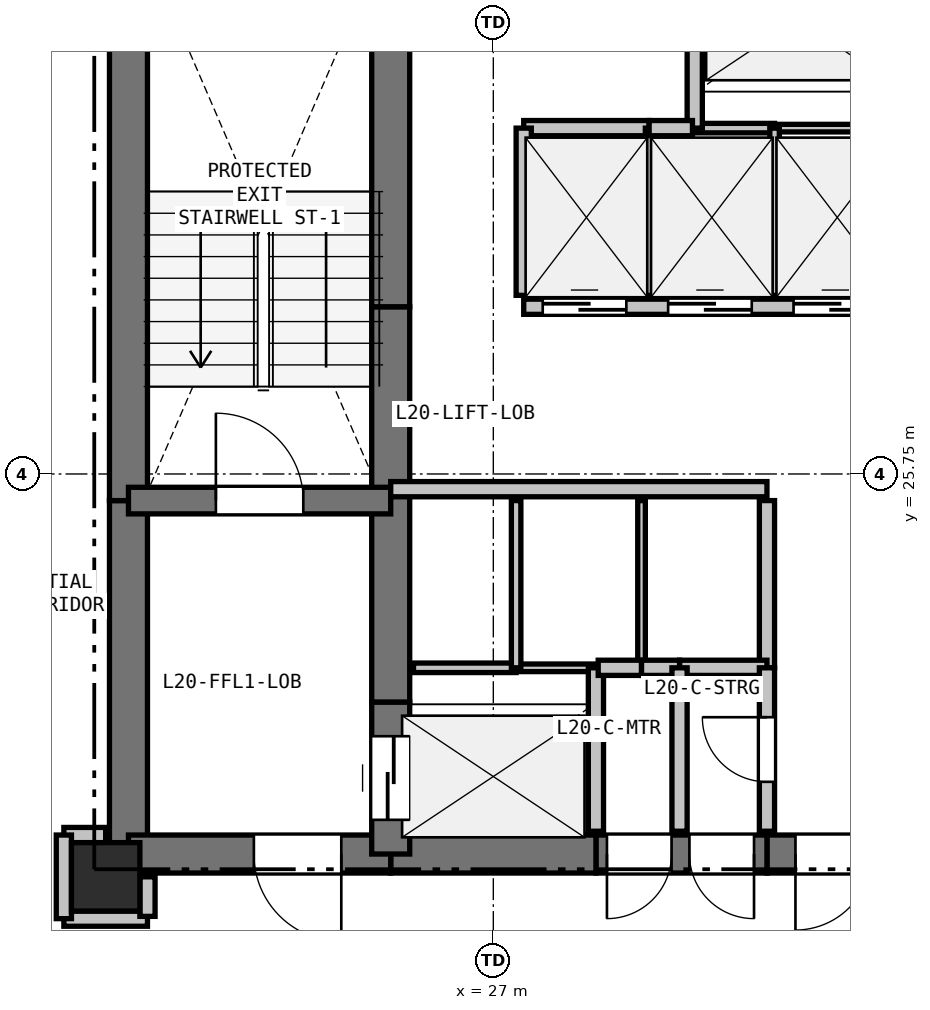
"""IFC4 building model, lengths in metres.
Left out: names, types, materials, properties, quantities, classifications, styles, units other than length and angle.
Written with IfcOpenShell. Run it as: python <this file> out.ifc"""

import sys

from ifc_helpers import new_model, si_unit, direction, frame, frame_2d, origin, origin_2d, place, context, subcontext, project, spatial, rectangle, extrude, element, fill, save


model = new_model("IFC4")
c1 = context("Model", 3, precision=1e-05, world=origin(), true_north=direction((0.0, 1.0)))
c2 = subcontext(c1, "Body", "Model", "MODEL_VIEW")
j1 = project(units=[si_unit("LENGTHUNIT", "METRE"), si_unit("PLANEANGLEUNIT", "RADIAN")], contexts=[c1])
p1 = place(None, origin())
s1 = spatial("IfcSite", under=j1, at=p1, CompositionType="ELEMENT")
p2 = place(p1, origin())
s2 = spatial("IfcBuilding", under=s1, at=p2, CompositionType="ELEMENT")
p3 = place(p2, frame((0.0, 0.0, 76.8)))
s3 = spatial("IfcBuildingStorey", under=s2, at=p3, CompositionType="ELEMENT", Elevation=76.8)
p4 = place(p3, frame((21.9, 20.45, 0.0), z_axis=(0.0, 0.0, 1.0), x_axis=(1.0, 0.0, 0.0)))
e1 = element("IfcColumn", 1, at=p4, inside=s3, PredefinedType="COLUMN", context=c2, shape_type="SweptSolid", body=[
    extrude(rectangle(XDim=0.9, YDim=0.9, at=origin_2d()), origin(), (0.0, 0.0, 1.0), 3.3),
])
p5 = place(p3, frame((22.2, 20.75, 0.0), z_axis=(0.0, 0.0, 1.0), x_axis=(0.0, 1.0, 0.0)))
e2 = element("IfcWall", 2, at=p5, inside=s3, PredefinedType="SHEAR", context=c2, shape_type="SweptSolid", body=[
    extrude(rectangle(XDim=4.65, YDim=0.5, at=frame_2d((2.325, 0.0))), origin(), (0.0, 0.0, 1.0), 3.05),
])
p6 = place(p3, frame((22.2, 25.4, 0.0), z_axis=(0.0, 0.0, 1.0), x_axis=(0.0, 1.0, 0.0)))
e3 = element("IfcWall", 3, at=p6, inside=s3, PredefinedType="SHEAR", context=c2, shape_type="SweptSolid", body=[
    extrude(rectangle(XDim=7.35, YDim=0.5, at=frame_2d((3.675, 0.0))), origin(), (0.0, 0.0, 1.0), 3.05),
])
p7 = place(p3, frame((32.35, 20.75, 0.0), z_axis=(0.0, 0.0, 1.0), x_axis=(-1.0, 0.0, 0.0)))
e4 = element("IfcWall", 4, at=p7, inside=s3, PredefinedType="SHEAR", context=c2, shape_type="SweptSolid", body=[
    extrude(rectangle(XDim=1.75, YDim=0.5, at=frame_2d((0.875, 0.0))), origin(), (0.0, 0.0, 1.0), 3.05),
])
p8 = place(p7, frame((0.375, 0.0, 0.0)))
e5 = element("IfcOpeningElement", 5, at=p8, cuts=e4, PredefinedType="OPENING", context=c2, shape_type="SweptSolid", body=[
    extrude(rectangle(XDim=1.0, YDim=2.15, at=frame_2d((0.5, 1.075))), frame((0.0, 0.26, 0.0), z_axis=(0.0, -1.0, 0.0), x_axis=(1.0, 0.0, 0.0)), (0.0, 0.0, 1.0), 0.52),
])
p9 = place(p3, frame((30.6, 20.75, 0.0), z_axis=(0.0, 0.0, 1.0), x_axis=(-1.0, 0.0, 0.0)))
e6 = element("IfcWall", 6, at=p9, inside=s3, PredefinedType="SHEAR", context=c2, shape_type="SweptSolid", body=[
    extrude(rectangle(XDim=2.25, YDim=0.5, at=frame_2d((1.125, 0.0))), origin(), (0.0, 0.0, 1.0), 3.05),
])
p10 = place(p9, frame((1.255, 0.0, 0.0)))
e7 = element("IfcOpeningElement", 7, at=p10, cuts=e6, PredefinedType="OPENING", context=c2, shape_type="SweptSolid", body=[
    extrude(rectangle(XDim=0.85, YDim=2.1, at=frame_2d((0.425, 1.05))), frame((0.0, 0.26, 0.0), z_axis=(0.0, -1.0, 0.0), x_axis=(1.0, 0.0, 0.0)), (0.0, 0.0, 1.0), 0.52),
])
p11 = place(p9, frame((0.17, 0.0, 0.0)))
e8 = element("IfcOpeningElement", 8, at=p11, cuts=e6, PredefinedType="OPENING", context=c2, shape_type="SweptSolid", body=[
    extrude(rectangle(XDim=0.85, YDim=2.1, at=frame_2d((0.425, 1.05))), frame((0.0, 0.26, 0.0), z_axis=(0.0, -1.0, 0.0), x_axis=(1.0, 0.0, 0.0)), (0.0, 0.0, 1.0), 0.52),
])
p12 = place(p3, frame((28.35, 20.75, 0.0), z_axis=(0.0, 0.0, 1.0), x_axis=(-1.0, 0.0, 0.0)))
e9 = element("IfcWall", 9, at=p12, inside=s3, PredefinedType="SHEAR", context=c2, shape_type="SweptSolid", body=[
    extrude(rectangle(XDim=2.7, YDim=0.5, at=frame_2d((1.35, 0.0))), origin(), (0.0, 0.0, 1.0), 3.05),
])
p13 = place(p3, frame((25.65, 20.75, 0.0), z_axis=(0.0, 0.0, 1.0), x_axis=(-1.0, 0.0, 0.0)))
e10 = element("IfcWall", 10, at=p13, inside=s3, PredefinedType="SHEAR", context=c2, shape_type="SweptSolid", body=[
    extrude(rectangle(XDim=3.45, YDim=0.5, at=frame_2d((1.725, 0.0))), origin(), (0.0, 0.0, 1.0), 3.05),
])
p14 = place(p13, frame((0.65, 0.0, 0.0)))
e11 = element("IfcOpeningElement", 11, at=p14, cuts=e10, PredefinedType="OPENING", context=c2, shape_type="SweptSolid", body=[
    extrude(rectangle(XDim=1.15, YDim=2.15, at=frame_2d((0.575, 1.075))), frame((0.0, 0.26, 0.0), z_axis=(0.0, -1.0, 0.0), x_axis=(1.0, 0.0, 0.0)), (0.0, 0.0, 1.0), 0.52),
])
p15 = place(p3, frame((25.65, 20.75, 0.0), z_axis=(0.0, 0.0, 1.0), x_axis=(0.0, 1.0, 0.0)))
e12 = element("IfcWall", 12, at=p15, inside=s3, PredefinedType="SHEAR", context=c2, shape_type="SweptSolid", body=[
    extrude(rectangle(XDim=2.0, YDim=0.5, at=frame_2d((1.0, 0.0))), origin(), (0.0, 0.0, 1.0), 3.05),
])
p16 = place(p15, frame((0.45, 0.0, 0.0)))
e13 = element("IfcOpeningElement", 13, at=p16, cuts=e12, PredefinedType="OPENING", context=c2, shape_type="SweptSolid", body=[
    extrude(rectangle(XDim=1.1, YDim=2.15, at=frame_2d((0.55, 1.075))), frame((0.0, 0.26, 0.0), z_axis=(0.0, -1.0, 0.0), x_axis=(1.0, 0.0, 0.0)), (0.0, 0.0, 1.0), 0.52),
])
p17 = place(p3, frame((25.65, 22.75, 0.0), z_axis=(0.0, 0.0, 1.0), x_axis=(0.0, 1.0, 0.0)))
e14 = element("IfcWall", 14, at=p17, inside=s3, PredefinedType="SHEAR", context=c2, shape_type="SweptSolid", body=[
    extrude(rectangle(XDim=2.8, YDim=0.5, at=frame_2d((1.4, 0.0))), origin(), (0.0, 0.0, 1.0), 3.05),
])
p18 = place(p3, frame((25.65, 25.55, 0.0), z_axis=(0.0, 0.0, 1.0), x_axis=(0.0, 1.0, 0.0)))
e15 = element("IfcWall", 15, at=p18, inside=s3, PredefinedType="SHEAR", context=c2, shape_type="SweptSolid", body=[
    extrude(rectangle(XDim=2.4, YDim=0.5, at=frame_2d((1.2, 0.0))), origin(), (0.0, 0.0, 1.0), 3.05),
])
p19 = place(p3, frame((25.65, 27.95, 0.0), z_axis=(0.0, 0.0, 1.0), x_axis=(0.0, 1.0, 0.0)))
e16 = element("IfcWall", 16, at=p19, inside=s3, PredefinedType="SHEAR", context=c2, shape_type="SweptSolid", body=[
    extrude(rectangle(XDim=4.8, YDim=0.5, at=frame_2d((2.4, 0.0))), origin(), (0.0, 0.0, 1.0), 3.05),
])
p20 = place(p3, frame((22.2, 25.4, 0.0), z_axis=(0.0, 0.0, 1.0), x_axis=(1.0, 0.0, 0.0)))
e17 = element("IfcWall", 17, at=p20, inside=s3, PredefinedType="SHEAR", context=c2, shape_type="SweptSolid", body=[
    extrude(rectangle(XDim=3.45, YDim=0.35, at=frame_2d((1.725, 0.0))), origin(), (0.0, 0.0, 1.0), 3.05),
])
p21 = place(p20, frame((1.15, 0.0, 0.0)))
e18 = element("IfcOpeningElement", 18, at=p21, cuts=e17, PredefinedType="OPENING", context=c2, shape_type="SweptSolid", body=[
    extrude(rectangle(XDim=1.15, YDim=2.15, at=frame_2d((0.575, 1.075))), frame((0.0, 0.185, 0.0), z_axis=(0.0, -1.0, 0.0), x_axis=(1.0, 0.0, 0.0)), (0.0, 0.0, 1.0), 0.37),
])
p22 = place(p3, frame((25.65, 25.55, 0.0), z_axis=(0.0, 0.0, 1.0), x_axis=(1.0, 0.0, 0.0)))
e19 = element("IfcWall", 19, at=p22, inside=s3, PredefinedType="PARTITIONING", context=c2, shape_type="SweptSolid", body=[
    extrude(rectangle(XDim=4.95, YDim=0.2, at=frame_2d((2.475, 0.0))), origin(), (0.0, 0.0, 1.0), 3.05),
])
p23 = place(p3, frame((27.4, 27.95, 0.0), z_axis=(0.0, 0.0, 1.0), x_axis=(1.0, 0.0, 0.0)))
e20 = element("IfcWall", 20, at=p23, inside=s3, PredefinedType="PARTITIONING", context=c2, shape_type="SweptSolid", body=[
    extrude(rectangle(XDim=4.95, YDim=0.2, at=frame_2d((2.475, 0.0))), origin(), (0.0, 0.0, 1.0), 3.05),
])
p24 = place(p23, frame((0.25, 0.0, 0.0)))
e21 = element("IfcOpeningElement", 21, at=p24, cuts=e20, PredefinedType="OPENING", context=c2, shape_type="SweptSolid", body=[
    extrude(rectangle(XDim=1.1, YDim=2.15, at=frame_2d((0.55, 1.075))), frame((0.0, 0.11, 0.0), z_axis=(0.0, -1.0, 0.0), x_axis=(1.0, 0.0, 0.0)), (0.0, 0.0, 1.0), 0.22),
])
p25 = place(p23, frame((1.9, 0.0, 0.0)))
e22 = element("IfcOpeningElement", 22, at=p25, cuts=e20, PredefinedType="OPENING", context=c2, shape_type="SweptSolid", body=[
    extrude(rectangle(XDim=1.1, YDim=2.15, at=frame_2d((0.55, 1.075))), frame((0.0, 0.11, 0.0), z_axis=(0.0, -1.0, 0.0), x_axis=(1.0, 0.0, 0.0)), (0.0, 0.0, 1.0), 0.22),
])
p26 = place(p23, frame((3.55, 0.0, 0.0)))
e23 = element("IfcOpeningElement", 23, at=p26, cuts=e20, PredefinedType="OPENING", context=c2, shape_type="SweptSolid", body=[
    extrude(rectangle(XDim=1.1, YDim=2.15, at=frame_2d((0.55, 1.075))), frame((0.0, 0.11, 0.0), z_axis=(0.0, -1.0, 0.0), x_axis=(1.0, 0.0, 0.0)), (0.0, 0.0, 1.0), 0.22),
])
p27 = place(p3, frame((25.95, 23.2, 0.0), z_axis=(0.0, 0.0, 1.0), x_axis=(1.0, 0.0, 0.0)))
e24 = element("IfcWall", 24, at=p27, inside=s3, PredefinedType="PARTITIONING", context=c2, shape_type="SweptSolid", body=[
    extrude(rectangle(XDim=1.35, YDim=0.125, at=frame_2d((0.675, 0.0))), origin(), (0.0, 0.0, 1.0), 3.05),
])
p28 = place(p3, frame((27.3, 23.2, 0.0), z_axis=(0.0, 0.0, 1.0), x_axis=(1.0, 0.0, 0.0)))
e25 = element("IfcWall", 25, at=p28, inside=s3, PredefinedType="PARTITIONING", context=c2, shape_type="SweptSolid", body=[
    extrude(rectangle(XDim=1.05, YDim=0.1, at=frame_2d((0.525, 0.0))), origin(), (0.0, 0.0, 1.0), 3.05),
])
p29 = place(p3, frame((28.35, 23.2, 0.0), z_axis=(0.0, 0.0, 1.0), x_axis=(0.0, -1.0, 0.0)))
e26 = element("IfcWall", 26, at=p29, inside=s3, PredefinedType="PARTITIONING", context=c2, shape_type="SweptSolid", body=[
    extrude(rectangle(XDim=2.15, YDim=0.2, at=frame_2d((1.075, 0.0))), origin(), (0.0, 0.0, 1.0), 3.05),
])
p30 = place(p3, frame((32.05, 30.3, 0.0), z_axis=(0.0, 0.0, 1.0), x_axis=(-1.0, 0.0, 0.0)))
e27 = element("IfcWall", 27, at=p30, inside=s3, PredefinedType="PARTITIONING", context=c2, shape_type="SweptSolid", body=[
    extrude(rectangle(XDim=1.35, YDim=0.1, at=frame_2d((0.675, 0.0))), origin(), (0.0, 0.0, 1.0), 3.05),
])
p31 = place(p3, frame((30.7, 30.3, 0.0), z_axis=(0.0, 0.0, 1.0), x_axis=(-1.0, 0.0, 0.0)))
e28 = element("IfcWall", 28, at=p31, inside=s3, PredefinedType="PARTITIONING", context=c2, shape_type="SweptSolid", body=[
    extrude(rectangle(XDim=1.05, YDim=0.125, at=frame_2d((0.525, 0.0))), origin(), (0.0, 0.0, 1.0), 3.05),
])
p32 = place(p3, frame((29.65, 30.3, 0.0), z_axis=(0.0, 0.0, 1.0), x_axis=(0.0, 1.0, 0.0)))
e29 = element("IfcWall", 29, at=p32, inside=s3, PredefinedType="PARTITIONING", context=c2, shape_type="SweptSolid", body=[
    extrude(rectangle(XDim=2.15, YDim=0.2, at=frame_2d((1.075, 0.0))), origin(), (0.0, 0.0, 1.0), 3.05),
])
p33 = place(p3, frame((27.3, 25.4, 0.0), z_axis=(0.0, 0.0, 1.0), x_axis=(0.0, -1.0, 0.0)))
e30 = element("IfcWall", 30, at=p33, inside=s3, PredefinedType="PARTITIONING", context=c2, shape_type="SweptSolid", body=[
    extrude(rectangle(XDim=2.2, YDim=0.125, at=frame_2d((1.1, 0.0))), origin(), (0.0, 0.0, 1.0), 3.05),
])
p34 = place(p3, frame((28.95, 25.4, 0.0), z_axis=(0.0, 0.0, 1.0), x_axis=(0.0, -1.0, 0.0)))
e31 = element("IfcWall", 31, at=p34, inside=s3, PredefinedType="PARTITIONING", context=c2, shape_type="SweptSolid", body=[
    extrude(rectangle(XDim=2.2, YDim=0.1, at=frame_2d((1.1, 0.0))), origin(), (0.0, 0.0, 1.0), 3.05),
])
p35 = place(p3, frame((28.95, 23.2, 0.0), z_axis=(0.0, 0.0, 1.0), x_axis=(-1.0, 0.0, 0.0)))
e32 = element("IfcWall", 32, at=p35, inside=s3, PredefinedType="PARTITIONING", context=c2, shape_type="SweptSolid", body=[
    extrude(rectangle(XDim=0.57, YDim=0.2, at=frame_2d((0.285, 0.0))), origin(), (0.0, 0.0, 1.0), 3.05),
])
p36 = place(p3, frame((30.6, 25.4, 0.0), z_axis=(0.0, 0.0, 1.0), x_axis=(0.0, -1.0, 0.0)))
e33 = element("IfcWall", 33, at=p36, inside=s3, PredefinedType="PARTITIONING", context=c2, shape_type="SweptSolid", body=[
    extrude(rectangle(XDim=2.2, YDim=0.2, at=frame_2d((1.1, 0.0))), origin(), (0.0, 0.0, 1.0), 3.05),
])
p37 = place(p3, frame((30.6, 23.2, 0.0), z_axis=(0.0, 0.0, 1.0), x_axis=(-1.0, 0.0, 0.0)))
e34 = element("IfcWall", 34, at=p37, inside=s3, PredefinedType="PARTITIONING", context=c2, shape_type="SweptSolid", body=[
    extrude(rectangle(XDim=1.15, YDim=0.2, at=frame_2d((0.575, 0.0))), origin(), (0.0, 0.0, 1.0), 3.05),
])
p38 = place(p3, frame((29.45, 23.2, 0.0), z_axis=(0.0, 0.0, 1.0), x_axis=(-1.0, 0.0, 0.0)))
e35 = element("IfcWall", 35, at=p38, inside=s3, PredefinedType="PARTITIONING", context=c2, shape_type="SweptSolid", body=[
    extrude(rectangle(XDim=0.5, YDim=0.2, at=frame_2d((0.25, 0.0))), origin(), (0.0, 0.0, 1.0), 3.05),
])
p39 = place(p3, frame((27.4, 30.3, 0.0), z_axis=(0.0, 0.0, 1.0), x_axis=(1.0, 0.0, 0.0)))
e36 = element("IfcWall", 36, at=p39, inside=s3, PredefinedType="PARTITIONING", context=c2, shape_type="SweptSolid", body=[
    extrude(rectangle(XDim=1.65, YDim=0.2, at=frame_2d((0.825, 0.0))), origin(), (0.0, 0.0, 1.0), 3.05),
])
p40 = place(p3, frame((29.05, 30.3, 0.0), z_axis=(0.0, 0.0, 1.0), x_axis=(0.0, -1.0, 0.0)))
e37 = element("IfcWall", 37, at=p40, inside=s3, PredefinedType="PARTITIONING", context=c2, shape_type="SweptSolid", body=[
    extrude(rectangle(XDim=2.2, YDim=0.1, at=frame_2d((1.1, 0.0))), origin(), (0.0, 0.0, 1.0), 3.05),
])
p41 = place(p3, frame((27.4, 28.1, 0.0), z_axis=(0.0, 0.0, 1.0), x_axis=(0.0, 1.0, 0.0)))
e38 = element("IfcWall", 38, at=p41, inside=s3, PredefinedType="PARTITIONING", context=c2, shape_type="SweptSolid", body=[
    extrude(rectangle(XDim=2.2, YDim=0.2, at=frame_2d((1.1, 0.0))), origin(), (0.0, 0.0, 1.0), 3.05),
])
p42 = place(p3, frame((29.05, 30.3, 0.0), z_axis=(0.0, 0.0, 1.0), x_axis=(1.0, 0.0, 0.0)))
e39 = element("IfcWall", 39, at=p42, inside=s3, PredefinedType="PARTITIONING", context=c2, shape_type="SweptSolid", body=[
    extrude(rectangle(XDim=0.57, YDim=0.2, at=frame_2d((0.285, 0.0))), origin(), (0.0, 0.0, 1.0), 3.05),
])
p43 = place(p3, frame((30.7, 30.3, 0.0), z_axis=(0.0, 0.0, 1.0), x_axis=(0.0, -1.0, 0.0)))
e40 = element("IfcWall", 40, at=p43, inside=s3, PredefinedType="PARTITIONING", context=c2, shape_type="SweptSolid", body=[
    extrude(rectangle(XDim=2.2, YDim=0.125, at=frame_2d((1.1, 0.0))), origin(), (0.0, 0.0, 1.0), 3.05),
])
p44 = place(p3, frame((30.6, 21.05, 0.0), z_axis=(0.0, 0.0, 1.0), x_axis=(0.0, 1.0, 0.0)))
e41 = element("IfcWall", 41, at=p44, inside=s3, PredefinedType="PARTITIONING", context=c2, shape_type="SweptSolid", body=[
    extrude(rectangle(XDim=2.15, YDim=0.2, at=frame_2d((1.075, 0.0))), origin(), (0.0, 0.0, 1.0), 3.05),
])
p45 = place(p44, frame((0.65, 0.0, 0.0)))
e42 = element("IfcOpeningElement", 42, at=p45, cuts=e41, PredefinedType="OPENING", context=c2, shape_type="SweptSolid", body=[
    extrude(rectangle(XDim=0.85, YDim=2.1, at=frame_2d((0.425, 1.05))), frame((0.0, 0.11, 0.0), z_axis=(0.0, -1.0, 0.0), x_axis=(1.0, 0.0, 0.0)), (0.0, 0.0, 1.0), 0.22),
])
p46 = place(p3, frame((21.35, 19.9, 0.0), z_axis=(0.0, 0.0, 1.0), x_axis=(1.0, 0.0, 0.0)))
e43 = element("IfcWall", 43, at=p46, inside=s3, PredefinedType="PARTITIONING", context=c2, shape_type="SweptSolid", body=[
    extrude(rectangle(XDim=1.1, YDim=0.2, at=frame_2d((0.55, 0.0))), origin(), (0.0, 0.0, 1.0), 2.423),
])
p47 = place(p3, frame((22.45, 19.93, 0.0), z_axis=(0.0, 0.0, 1.0), x_axis=(0.0, 1.0, 0.0)))
e44 = element("IfcWall", 44, at=p47, inside=s3, PredefinedType="PARTITIONING", context=c2, shape_type="SweptSolid", body=[
    extrude(rectangle(XDim=0.52, YDim=0.2, at=frame_2d((0.26, 0.0))), origin(), (0.0, 0.0, 1.0), 2.423),
])
p48 = place(p3, frame((21.9, 21.0, 0.0), z_axis=(0.0, 0.0, 1.0), x_axis=(-1.0, 0.0, 0.0)))
e45 = element("IfcWall", 45, at=p48, inside=s3, PredefinedType="PARTITIONING", context=c2, shape_type="SweptSolid", body=[
    extrude(rectangle(XDim=0.55, YDim=0.2, at=frame_2d((0.275, 0.0))), origin(), (0.0, 0.0, 1.0), 2.498),
])
p49 = place(p3, frame((21.35, 21.0, 0.0), z_axis=(0.0, 0.0, 1.0), x_axis=(0.0, -1.0, 0.0)))
e46 = element("IfcWall", 46, at=p49, inside=s3, PredefinedType="PARTITIONING", context=c2, shape_type="SweptSolid", body=[
    extrude(rectangle(XDim=1.1, YDim=0.2, at=frame_2d((0.55, 0.0))), origin(), (0.0, 0.0, 1.0), 2.423),
])
p50 = place(p3, frame((29.45, 23.2, 0.0), z_axis=(0.0, 0.0, 1.0), x_axis=(0.0, -1.0, 0.0)))
e47 = element("IfcWall", 47, at=p50, inside=s3, PredefinedType="PARTITIONING", context=c2, shape_type="SweptSolid", body=[
    extrude(rectangle(XDim=2.15, YDim=0.2, at=frame_2d((1.075, 0.0))), origin(), (0.0, 0.0, 1.0), 3.05),
])
p51 = place(p24, origin())
e48 = element("IfcDoor", 48, at=p51, inside=s3, OperationType="SLIDING_TO_LEFT", PredefinedType="DOOR", context=c2, shape_type="SweptSolid", body=[
    extrude(rectangle(XDim=1.1, YDim=2.15, at=frame_2d((0.55, 1.075))), frame((0.0, 0.025, 0.0), z_axis=(0.0, -1.0, 0.0), x_axis=(1.0, 0.0, 0.0)), (0.0, 0.0, 1.0), 0.05),
])
fill(e21, e48)
p52 = place(p25, origin())
e49 = element("IfcDoor", 49, at=p52, inside=s3, OperationType="SLIDING_TO_LEFT", PredefinedType="DOOR", context=c2, shape_type="SweptSolid", body=[
    extrude(rectangle(XDim=1.1, YDim=2.15, at=frame_2d((0.55, 1.075))), frame((0.0, 0.025, 0.0), z_axis=(0.0, -1.0, 0.0), x_axis=(1.0, 0.0, 0.0)), (0.0, 0.0, 1.0), 0.05),
])
fill(e22, e49)
p53 = place(p26, origin())
e50 = element("IfcDoor", 50, at=p53, inside=s3, OperationType="SLIDING_TO_LEFT", PredefinedType="DOOR", context=c2, shape_type="SweptSolid", body=[
    extrude(rectangle(XDim=1.1, YDim=2.15, at=frame_2d((0.55, 1.075))), frame((0.0, 0.025, 0.0), z_axis=(0.0, -1.0, 0.0), x_axis=(1.0, 0.0, 0.0)), (0.0, 0.0, 1.0), 0.05),
])
fill(e23, e50)
p54 = place(p8, origin())
e51 = element("IfcDoor", 51, at=p54, inside=s3, OperationType="SINGLE_SWING_RIGHT", PredefinedType="DOOR", context=c2, shape_type="SweptSolid", body=[
    extrude(rectangle(XDim=1.0, YDim=2.15, at=frame_2d((0.5, 1.075))), frame((0.0, 0.025, 0.0), z_axis=(0.0, -1.0, 0.0), x_axis=(1.0, 0.0, 0.0)), (0.0, 0.0, 1.0), 0.05),
])
fill(e5, e51)
p55 = place(p16, origin())
e52 = element("IfcDoor", 52, at=p55, inside=s3, OperationType="SLIDING_TO_LEFT", PredefinedType="DOOR", context=c2, shape_type="SweptSolid", body=[
    extrude(rectangle(XDim=1.1, YDim=2.15, at=frame_2d((0.55, 1.075))), frame((0.0, 0.025, 0.0), z_axis=(0.0, -1.0, 0.0), x_axis=(1.0, 0.0, 0.0)), (0.0, 0.0, 1.0), 0.05),
])
fill(e13, e52)
p56 = place(p21, origin())
e53 = element("IfcDoor", 53, at=p56, inside=s3, OperationType="SINGLE_SWING_LEFT", PredefinedType="DOOR", context=c2, shape_type="SweptSolid", body=[
    extrude(rectangle(XDim=1.15, YDim=2.15, at=frame_2d((0.575, 1.075))), frame((0.0, 0.025, 0.0), z_axis=(0.0, -1.0, 0.0), x_axis=(1.0, 0.0, 0.0)), (0.0, 0.0, 1.0), 0.05),
])
fill(e18, e53)
p57 = place(p14, origin())
e54 = element("IfcDoor", 54, at=p57, inside=s3, OperationType="SINGLE_SWING_LEFT", PredefinedType="DOOR", context=c2, shape_type="SweptSolid", body=[
    extrude(rectangle(XDim=1.15, YDim=2.15, at=frame_2d((0.575, 1.075))), frame((0.0, 0.025, 0.0), z_axis=(0.0, -1.0, 0.0), x_axis=(1.0, 0.0, 0.0)), (0.0, 0.0, 1.0), 0.05),
])
fill(e11, e54)
p58 = place(p45, origin())
e55 = element("IfcDoor", 55, at=p58, inside=s3, OperationType="SINGLE_SWING_RIGHT", PredefinedType="DOOR", context=c2, shape_type="SweptSolid", body=[
    extrude(rectangle(XDim=0.85, YDim=2.1, at=frame_2d((0.425, 1.05))), frame((0.0, 0.025, 0.0), z_axis=(0.0, -1.0, 0.0), x_axis=(1.0, 0.0, 0.0)), (0.0, 0.0, 1.0), 0.05),
])
fill(e42, e55)
p59 = place(p10, origin())
e56 = element("IfcDoor", 56, at=p59, inside=s3, OperationType="SINGLE_SWING_RIGHT", PredefinedType="DOOR", context=c2, shape_type="SweptSolid", body=[
    extrude(rectangle(XDim=0.85, YDim=2.1, at=frame_2d((0.425, 1.05))), frame((0.0, 0.025, 0.0), z_axis=(0.0, -1.0, 0.0), x_axis=(1.0, 0.0, 0.0)), (0.0, 0.0, 1.0), 0.05),
])
fill(e7, e56)
p60 = place(p11, origin())
e57 = element("IfcDoor", 57, at=p60, inside=s3, OperationType="SINGLE_SWING_LEFT", PredefinedType="DOOR", context=c2, shape_type="SweptSolid", body=[
    extrude(rectangle(XDim=0.85, YDim=2.1, at=frame_2d((0.425, 1.05))), frame((0.0, 0.025, 0.0), z_axis=(0.0, -1.0, 0.0), x_axis=(1.0, 0.0, 0.0)), (0.0, 0.0, 1.0), 0.05),
])
fill(e8, e57)
save(model, sys.argv[1])
